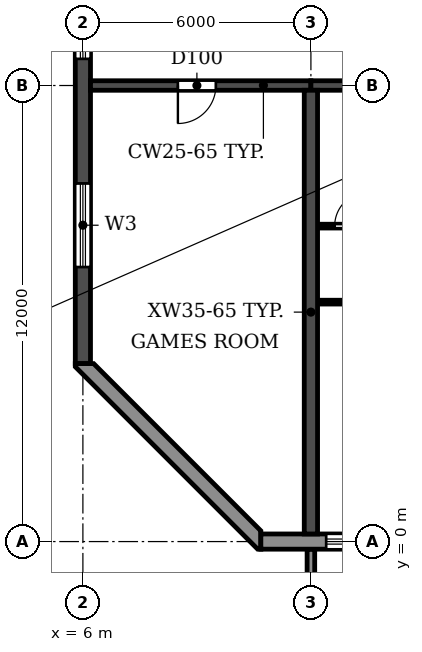
"""IFC4 building model, lengths in metres.
Left out: names, types, materials, properties, quantities, classifications, styles, units other than length and angle.
Written with IfcOpenShell. Run it as: python <this file> out.ifc"""

import sys

from ifc_helpers import new_model, si_unit, direction, frame, frame_2d, origin, place, context, subcontext, project, spatial, polyline, rectangle, outline, extrude, source, transform, mapped, element, fill, save


model = new_model("IFC4")
c1 = context("Model", 3, precision=1e-05, world=origin(), true_north=direction((0.0, 1.0)))
c2 = subcontext(c1, "Body", "Model", "MODEL_VIEW")
j1 = project(units=[si_unit("LENGTHUNIT", "METRE"), si_unit("PLANEANGLEUNIT", "RADIAN")], contexts=[c1])
p1 = place(None, origin())
s1 = spatial("IfcSite", under=j1, at=p1, CompositionType="ELEMENT")
p2 = place(p1, origin())
s2 = spatial("IfcBuilding", under=s1, at=p2, CompositionType="ELEMENT")
p3 = place(p2, frame((0.0, 0.0, 102.6)))
s3 = spatial("IfcBuildingStorey", under=s2, at=p3, CompositionType="ELEMENT", Elevation=102.6)
p4 = place(p3, frame((12.0, 0.2, 0.0), z_axis=(0.0, 0.0, 1.0), x_axis=(0.0, 1.0, 0.0)))
e1 = element("IfcWall", 1, at=p4, inside=s3, PredefinedType="SHEAR", context=c2, shape_type="SweptSolid", body=[
    extrude(rectangle(XDim=11.675, YDim=0.35, at=frame_2d((5.837, 0.0))), origin(), (0.0, 0.0, 1.0), 3.0),
])
p5 = place(p3, frame((6.0, 4.683, 0.0), z_axis=(0.0, 0.0, 1.0), x_axis=(0.0, 1.0, 0.0)))
e2 = element("IfcWall", 2, at=p5, inside=s3, PredefinedType="SHEAR", context=c2, shape_type="SweptSolid", body=[
    extrude(rectangle(XDim=34.234, YDim=0.4, at=frame_2d((17.117, 0.0))), origin(), (0.0, 0.0, 1.0), 3.0),
])
p6 = place(p5, frame((23.817, 0.0, 0.9)))
e3 = element("IfcOpeningElement", 3, at=p6, cuts=e2, PredefinedType="OPENING", context=c2, shape_type="SweptSolid", body=[
    extrude(rectangle(XDim=1.2, YDim=1.5, at=frame_2d((0.6, 0.75))), frame((0.0, 0.21, 0.0), z_axis=(0.0, -1.0, 0.0), x_axis=(1.0, 0.0, 0.0)), (0.0, 0.0, 1.0), 0.42),
])
p7 = place(p5, frame((8.017, 0.0, 0.9)))
e4 = element("IfcOpeningElement", 4, at=p7, cuts=e2, PredefinedType="OPENING", context=c2, shape_type="SweptSolid", body=[
    extrude(rectangle(XDim=1.2, YDim=1.5, at=frame_2d((0.6, 0.75))), frame((0.0, 0.21, 0.0), z_axis=(0.0, -1.0, 0.0), x_axis=(1.0, 0.0, 0.0)), (0.0, 0.0, 1.0), 0.42),
])
p8 = place(p5, frame((15.917, 0.0, 0.9)))
e5 = element("IfcOpeningElement", 5, at=p8, cuts=e2, PredefinedType="OPENING", context=c2, shape_type="SweptSolid", body=[
    extrude(rectangle(XDim=1.2, YDim=1.5, at=frame_2d((0.6, 0.75))), frame((0.0, 0.21, 0.0), z_axis=(0.0, -1.0, 0.0), x_axis=(1.0, 0.0, 0.0)), (0.0, 0.0, 1.0), 0.42),
])
p9 = place(p5, frame((28.894, 0.0, 0.6)))
e6 = element("IfcOpeningElement", 6, at=p9, cuts=e2, PredefinedType="OPENING", context=c2, shape_type="SweptSolid", body=[
    extrude(rectangle(XDim=2.2, YDim=1.8, at=frame_2d((1.1, 0.9))), frame((0.0, 0.21, 0.0), z_axis=(0.0, -1.0, 0.0), x_axis=(1.0, 0.0, 0.0)), (0.0, 0.0, 1.0), 0.42),
])
p10 = place(p5, frame((2.541, 0.0, 0.6)))
e7 = element("IfcOpeningElement", 7, at=p10, cuts=e2, PredefinedType="OPENING", context=c2, shape_type="SweptSolid", body=[
    extrude(rectangle(XDim=2.2, YDim=1.8, at=frame_2d((1.1, 0.9))), frame((0.0, 0.21, 0.0), z_axis=(0.0, -1.0, 0.0), x_axis=(1.0, 0.0, 0.0)), (0.0, 0.0, 1.0), 0.42),
])
p11 = place(p3, frame((6.2, 12.0, 0.0), z_axis=(0.0, 0.0, 1.0), x_axis=(1.0, 0.0, 0.0)))
e8 = element("IfcWall", 8, at=p11, inside=s3, PredefinedType="SHEAR", context=c2, shape_type="SweptSolid", body=[
    extrude(rectangle(XDim=5.8, YDim=0.25, at=frame_2d((2.9, 0.0))), origin(), (0.0, 0.0, 1.0), 2.4),
])
p12 = place(p11, frame((2.3, 0.0, 0.0)))
e9 = element("IfcOpeningElement", 9, at=p12, cuts=e8, PredefinedType="OPENING", context=c2, shape_type="SweptSolid", body=[
    extrude(rectangle(XDim=1.0, YDim=2.1, at=frame_2d((0.5, 1.05))), frame((0.0, 0.135, 0.0), z_axis=(0.0, -1.0, 0.0), x_axis=(1.0, 0.0, 0.0)), (0.0, 0.0, 1.0), 0.27),
])
p13 = place(p3, frame((12.0, 12.0, 0.0), z_axis=(0.0, 0.0, 1.0), x_axis=(1.0, 0.0, 0.0)))
e10 = element("IfcWall", 10, at=p13, inside=s3, PredefinedType="SHEAR", context=c2, shape_type="SweptSolid", body=[
    extrude(rectangle(XDim=6.0, YDim=0.25, at=frame_2d((3.0, 0.0))), origin(), (0.0, 0.0, 1.0), 2.4),
])
p14 = place(p13, frame((2.55, 0.0, 0.0)))
e11 = element("IfcOpeningElement", 11, at=p14, cuts=e10, PredefinedType="OPENING", context=c2, shape_type="SweptSolid", body=[
    extrude(rectangle(XDim=1.0, YDim=2.1, at=frame_2d((0.5, 1.05))), frame((0.0, 0.135, 0.0), z_axis=(0.0, -1.0, 0.0), x_axis=(1.0, 0.0, 0.0)), (0.0, 0.0, 1.0), 0.27),
])
p15 = place(p3, frame((10.683, 0.0, 0.0), z_axis=(0.0, 0.0, 1.0), x_axis=(1.0, 0.0, 0.0)))
e12 = element("IfcWall", 12, at=p15, inside=s3, PredefinedType="STANDARD", context=c2, shape_type="SweptSolid", body=[
    extrude(rectangle(XDim=80.634, YDim=0.4, at=frame_2d((40.317, 0.0))), origin(), (0.0, 0.0, 1.0), 3.0),
])
p16 = place(p15, frame((1.717, 0.0, 0.9)))
e13 = element("IfcOpeningElement", 13, at=p16, cuts=e12, PredefinedType="OPENING", context=c2, shape_type="SweptSolid", body=[
    extrude(rectangle(XDim=2.2, YDim=1.5, at=frame_2d((1.1, 0.75))), frame((0.0, 0.21, 0.0), z_axis=(0.0, -1.0, 0.0), x_axis=(1.0, 0.0, 0.0)), (0.0, 0.0, 1.0), 0.42),
])
p17 = place(p15, frame((4.917, 0.0, 0.0)))
e14 = element("IfcOpeningElement", 14, at=p17, cuts=e12, PredefinedType="OPENING", context=c2, shape_type="SweptSolid", body=[
    extrude(rectangle(XDim=1.8, YDim=2.4, at=frame_2d((0.9, 1.2))), frame((0.0, 0.21, 0.0), z_axis=(0.0, -1.0, 0.0), x_axis=(1.0, 0.0, 0.0)), (0.0, 0.0, 1.0), 0.42),
])
p18 = place(p15, frame((7.717, 0.0, 0.9)))
e15 = element("IfcOpeningElement", 15, at=p18, cuts=e12, PredefinedType="OPENING", context=c2, shape_type="SweptSolid", body=[
    extrude(rectangle(XDim=2.2, YDim=1.5, at=frame_2d((1.1, 0.75))), frame((0.0, 0.21, 0.0), z_axis=(0.0, -1.0, 0.0), x_axis=(1.0, 0.0, 0.0)), (0.0, 0.0, 1.0), 0.42),
])
p19 = place(p15, frame((10.717, 0.0, 0.9)))
e16 = element("IfcOpeningElement", 16, at=p19, cuts=e12, PredefinedType="OPENING", context=c2, shape_type="SweptSolid", body=[
    extrude(rectangle(XDim=2.2, YDim=1.5, at=frame_2d((1.1, 0.75))), frame((0.0, 0.21, 0.0), z_axis=(0.0, -1.0, 0.0), x_axis=(1.0, 0.0, 0.0)), (0.0, 0.0, 1.0), 0.42),
])
p20 = place(p15, frame((13.717, 0.0, 0.9)))
e17 = element("IfcOpeningElement", 17, at=p20, cuts=e12, PredefinedType="OPENING", context=c2, shape_type="SweptSolid", body=[
    extrude(rectangle(XDim=2.2, YDim=1.5, at=frame_2d((1.1, 0.75))), frame((0.0, 0.21, 0.0), z_axis=(0.0, -1.0, 0.0), x_axis=(1.0, 0.0, 0.0)), (0.0, 0.0, 1.0), 0.42),
])
p21 = place(p15, frame((16.717, 0.0, 0.9)))
e18 = element("IfcOpeningElement", 18, at=p21, cuts=e12, PredefinedType="OPENING", context=c2, shape_type="SweptSolid", body=[
    extrude(rectangle(XDim=2.2, YDim=1.5, at=frame_2d((1.1, 0.75))), frame((0.0, 0.21, 0.0), z_axis=(0.0, -1.0, 0.0), x_axis=(1.0, 0.0, 0.0)), (0.0, 0.0, 1.0), 0.42),
])
p22 = place(p15, frame((19.717, 0.0, 0.9)))
e19 = element("IfcOpeningElement", 19, at=p22, cuts=e12, PredefinedType="OPENING", context=c2, shape_type="SweptSolid", body=[
    extrude(rectangle(XDim=2.2, YDim=1.5, at=frame_2d((1.1, 0.75))), frame((0.0, 0.21, 0.0), z_axis=(0.0, -1.0, 0.0), x_axis=(1.0, 0.0, 0.0)), (0.0, 0.0, 1.0), 0.42),
])
p23 = place(p15, frame((22.717, 0.0, 0.9)))
e20 = element("IfcOpeningElement", 20, at=p23, cuts=e12, PredefinedType="OPENING", context=c2, shape_type="SweptSolid", body=[
    extrude(rectangle(XDim=2.2, YDim=1.5, at=frame_2d((1.1, 0.75))), frame((0.0, 0.21, 0.0), z_axis=(0.0, -1.0, 0.0), x_axis=(1.0, 0.0, 0.0)), (0.0, 0.0, 1.0), 0.42),
])
p24 = place(p15, frame((25.717, 0.0, 0.9)))
e21 = element("IfcOpeningElement", 21, at=p24, cuts=e12, PredefinedType="OPENING", context=c2, shape_type="SweptSolid", body=[
    extrude(rectangle(XDim=2.2, YDim=1.5, at=frame_2d((1.1, 0.75))), frame((0.0, 0.21, 0.0), z_axis=(0.0, -1.0, 0.0), x_axis=(1.0, 0.0, 0.0)), (0.0, 0.0, 1.0), 0.42),
])
p25 = place(p15, frame((28.917, 0.0, 0.0)))
e22 = element("IfcOpeningElement", 22, at=p25, cuts=e12, PredefinedType="OPENING", context=c2, shape_type="SweptSolid", body=[
    extrude(rectangle(XDim=1.8, YDim=2.4, at=frame_2d((0.9, 1.2))), frame((0.0, 0.21, 0.0), z_axis=(0.0, -1.0, 0.0), x_axis=(1.0, 0.0, 0.0)), (0.0, 0.0, 1.0), 0.42),
])
p26 = place(p15, frame((31.717, 0.0, 0.9)))
e23 = element("IfcOpeningElement", 23, at=p26, cuts=e12, PredefinedType="OPENING", context=c2, shape_type="SweptSolid", body=[
    extrude(rectangle(XDim=2.2, YDim=1.5, at=frame_2d((1.1, 0.75))), frame((0.0, 0.21, 0.0), z_axis=(0.0, -1.0, 0.0), x_axis=(1.0, 0.0, 0.0)), (0.0, 0.0, 1.0), 0.42),
])
p27 = place(p15, frame((34.717, 0.0, 0.9)))
e24 = element("IfcOpeningElement", 24, at=p27, cuts=e12, PredefinedType="OPENING", context=c2, shape_type="SweptSolid", body=[
    extrude(rectangle(XDim=2.2, YDim=1.5, at=frame_2d((1.1, 0.75))), frame((0.0, 0.21, 0.0), z_axis=(0.0, -1.0, 0.0), x_axis=(1.0, 0.0, 0.0)), (0.0, 0.0, 1.0), 0.42),
])
p28 = place(p15, frame((37.717, 0.0, 0.9)))
e25 = element("IfcOpeningElement", 25, at=p28, cuts=e12, PredefinedType="OPENING", context=c2, shape_type="SweptSolid", body=[
    extrude(rectangle(XDim=2.2, YDim=1.5, at=frame_2d((1.1, 0.75))), frame((0.0, 0.21, 0.0), z_axis=(0.0, -1.0, 0.0), x_axis=(1.0, 0.0, 0.0)), (0.0, 0.0, 1.0), 0.42),
])
p29 = place(p15, frame((40.717, 0.0, 0.9)))
e26 = element("IfcOpeningElement", 26, at=p29, cuts=e12, PredefinedType="OPENING", context=c2, shape_type="SweptSolid", body=[
    extrude(rectangle(XDim=2.2, YDim=1.5, at=frame_2d((1.1, 0.75))), frame((0.0, 0.21, 0.0), z_axis=(0.0, -1.0, 0.0), x_axis=(1.0, 0.0, 0.0)), (0.0, 0.0, 1.0), 0.42),
])
p30 = place(p15, frame((43.717, 0.0, 0.9)))
e27 = element("IfcOpeningElement", 27, at=p30, cuts=e12, PredefinedType="OPENING", context=c2, shape_type="SweptSolid", body=[
    extrude(rectangle(XDim=2.2, YDim=1.5, at=frame_2d((1.1, 0.75))), frame((0.0, 0.21, 0.0), z_axis=(0.0, -1.0, 0.0), x_axis=(1.0, 0.0, 0.0)), (0.0, 0.0, 1.0), 0.42),
])
p31 = place(p15, frame((46.717, 0.0, 0.9)))
e28 = element("IfcOpeningElement", 28, at=p31, cuts=e12, PredefinedType="OPENING", context=c2, shape_type="SweptSolid", body=[
    extrude(rectangle(XDim=2.2, YDim=1.5, at=frame_2d((1.1, 0.75))), frame((0.0, 0.21, 0.0), z_axis=(0.0, -1.0, 0.0), x_axis=(1.0, 0.0, 0.0)), (0.0, 0.0, 1.0), 0.42),
])
p32 = place(p15, frame((49.917, 0.0, 0.0)))
e29 = element("IfcOpeningElement", 29, at=p32, cuts=e12, PredefinedType="OPENING", context=c2, shape_type="SweptSolid", body=[
    extrude(rectangle(XDim=1.8, YDim=2.4, at=frame_2d((0.9, 1.2))), frame((0.0, 0.21, 0.0), z_axis=(0.0, -1.0, 0.0), x_axis=(1.0, 0.0, 0.0)), (0.0, 0.0, 1.0), 0.42),
])
p33 = place(p15, frame((52.717, 0.0, 0.9)))
e30 = element("IfcOpeningElement", 30, at=p33, cuts=e12, PredefinedType="OPENING", context=c2, shape_type="SweptSolid", body=[
    extrude(rectangle(XDim=2.2, YDim=1.5, at=frame_2d((1.1, 0.75))), frame((0.0, 0.21, 0.0), z_axis=(0.0, -1.0, 0.0), x_axis=(1.0, 0.0, 0.0)), (0.0, 0.0, 1.0), 0.42),
])
p34 = place(p15, frame((55.717, 0.0, 0.9)))
e31 = element("IfcOpeningElement", 31, at=p34, cuts=e12, PredefinedType="OPENING", context=c2, shape_type="SweptSolid", body=[
    extrude(rectangle(XDim=2.2, YDim=1.5, at=frame_2d((1.1, 0.75))), frame((0.0, 0.21, 0.0), z_axis=(0.0, -1.0, 0.0), x_axis=(1.0, 0.0, 0.0)), (0.0, 0.0, 1.0), 0.42),
])
p35 = place(p15, frame((58.717, 0.0, 0.9)))
e32 = element("IfcOpeningElement", 32, at=p35, cuts=e12, PredefinedType="OPENING", context=c2, shape_type="SweptSolid", body=[
    extrude(rectangle(XDim=2.2, YDim=1.5, at=frame_2d((1.1, 0.75))), frame((0.0, 0.21, 0.0), z_axis=(0.0, -1.0, 0.0), x_axis=(1.0, 0.0, 0.0)), (0.0, 0.0, 1.0), 0.42),
])
p36 = place(p15, frame((61.717, 0.0, 0.9)))
e33 = element("IfcOpeningElement", 33, at=p36, cuts=e12, PredefinedType="OPENING", context=c2, shape_type="SweptSolid", body=[
    extrude(rectangle(XDim=2.2, YDim=1.5, at=frame_2d((1.1, 0.75))), frame((0.0, 0.21, 0.0), z_axis=(0.0, -1.0, 0.0), x_axis=(1.0, 0.0, 0.0)), (0.0, 0.0, 1.0), 0.42),
])
p37 = place(p15, frame((64.717, 0.0, 0.9)))
e34 = element("IfcOpeningElement", 34, at=p37, cuts=e12, PredefinedType="OPENING", context=c2, shape_type="SweptSolid", body=[
    extrude(rectangle(XDim=2.2, YDim=1.5, at=frame_2d((1.1, 0.75))), frame((0.0, 0.21, 0.0), z_axis=(0.0, -1.0, 0.0), x_axis=(1.0, 0.0, 0.0)), (0.0, 0.0, 1.0), 0.42),
])
p38 = place(p15, frame((67.717, 0.0, 0.9)))
e35 = element("IfcOpeningElement", 35, at=p38, cuts=e12, PredefinedType="OPENING", context=c2, shape_type="SweptSolid", body=[
    extrude(rectangle(XDim=2.2, YDim=1.5, at=frame_2d((1.1, 0.75))), frame((0.0, 0.21, 0.0), z_axis=(0.0, -1.0, 0.0), x_axis=(1.0, 0.0, 0.0)), (0.0, 0.0, 1.0), 0.42),
])
p39 = place(p15, frame((70.717, 0.0, 0.9)))
e36 = element("IfcOpeningElement", 36, at=p39, cuts=e12, PredefinedType="OPENING", context=c2, shape_type="SweptSolid", body=[
    extrude(rectangle(XDim=2.2, YDim=1.5, at=frame_2d((1.1, 0.75))), frame((0.0, 0.21, 0.0), z_axis=(0.0, -1.0, 0.0), x_axis=(1.0, 0.0, 0.0)), (0.0, 0.0, 1.0), 0.42),
])
p40 = place(p15, frame((73.717, 0.0, 0.9)))
e37 = element("IfcOpeningElement", 37, at=p40, cuts=e12, PredefinedType="OPENING", context=c2, shape_type="SweptSolid", body=[
    extrude(rectangle(XDim=2.2, YDim=1.5, at=frame_2d((1.1, 0.75))), frame((0.0, 0.21, 0.0), z_axis=(0.0, -1.0, 0.0), x_axis=(1.0, 0.0, 0.0)), (0.0, 0.0, 1.0), 0.42),
])
p41 = place(p15, frame((76.917, 0.0, 0.0)))
e38 = element("IfcOpeningElement", 38, at=p41, cuts=e12, PredefinedType="OPENING", context=c2, shape_type="SweptSolid", body=[
    extrude(rectangle(XDim=1.8, YDim=2.4, at=frame_2d((0.9, 1.2))), frame((0.0, 0.21, 0.0), z_axis=(0.0, -1.0, 0.0), x_axis=(1.0, 0.0, 0.0)), (0.0, 0.0, 1.0), 0.42),
])
p42 = place(p3, origin())
e39 = element("IfcWall", 39, at=p42, inside=s3, PredefinedType="STANDARD", context=c2, shape_type="SweptSolid", body=[
    extrude(outline(polyline([(5.8, 4.683), (5.8, 4.6), (10.6, -0.2), (10.683, -0.2), (10.683, 0.283), (6.283, 4.683), (5.8, 4.683)])), origin(), (0.0, 0.0, 1.0), 3.0),
])
m1 = source(origin(), c2, "Body", "SweptSolid", [
    extrude(outline(polyline([(0.0, 0.0), (0.2, 0.0), (0.2, 1.65), (0.0, 1.65), (0.0, 0.0)])), origin(), (0.0, 0.0, 1.0), 3.1),
])
p43 = place(p3, frame((11.9, -1.85, 0.0)))
e40 = element("IfcWall", 40, at=p43, inside=s3, PredefinedType="STANDARD", context=c2, shape_type="MappedRepresentation", body=[
    mapped(m1, transform((0.0, 0.0, 0.0))),
])
p44 = place(p3, frame((12.185, 6.3, 0.0), z_axis=(0.0, 0.0, 1.0), x_axis=(1.0, 0.0, 0.0)))
e41 = element("IfcWall", 41, at=p44, inside=s3, PredefinedType="PARTITIONING", context=c2, shape_type="SweptSolid", body=[
    extrude(rectangle(XDim=2.865, YDim=0.1, at=frame_2d((1.433, 0.0))), origin(), (0.0, 0.0, 1.0), 3.0),
])
p45 = place(p44, frame((1.415, 0.0, 0.0)))
e42 = element("IfcOpeningElement", 42, at=p45, cuts=e41, PredefinedType="OPENING", context=c2, shape_type="SweptSolid", body=[
    extrude(rectangle(XDim=0.9, YDim=2.1, at=frame_2d((0.45, 1.05))), frame((0.0, 0.06, 0.0), z_axis=(0.0, -1.0, 0.0), x_axis=(1.0, 0.0, 0.0)), (0.0, 0.0, 1.0), 0.12),
])
p46 = place(p3, frame((12.185, 8.3, 0.0), z_axis=(0.0, 0.0, 1.0), x_axis=(1.0, 0.0, 0.0)))
e43 = element("IfcWall", 43, at=p46, inside=s3, PredefinedType="PARTITIONING", context=c2, shape_type="SweptSolid", body=[
    extrude(rectangle(XDim=2.015, YDim=0.1, at=frame_2d((1.007, 0.0))), origin(), (0.0, 0.0, 1.0), 3.0),
])
p47 = place(p46, frame((0.44, 0.0, 0.0)))
e44 = element("IfcOpeningElement", 44, at=p47, cuts=e43, PredefinedType="OPENING", context=c2, shape_type="SweptSolid", body=[
    extrude(rectangle(XDim=0.9, YDim=2.1, at=frame_2d((0.45, 1.05))), frame((0.0, 0.06, 0.0), z_axis=(0.0, -1.0, 0.0), x_axis=(1.0, 0.0, 0.0)), (0.0, 0.0, 1.0), 0.12),
])
p48 = place(p16, origin())
e45 = element("IfcWindow", 45, at=p48, inside=s3, PartitioningType="DOUBLE_PANEL_HORIZONTAL", PredefinedType="WINDOW", context=c2, shape_type="SweptSolid", body=[
    extrude(rectangle(XDim=2.2, YDim=1.5, at=frame_2d((1.1, 0.75))), frame((0.0, 0.03, 0.0), z_axis=(0.0, -1.0, 0.0), x_axis=(1.0, 0.0, 0.0)), (0.0, 0.0, 1.0), 0.06),
])
fill(e13, e45)
p49 = place(p7, origin())
e46 = element("IfcWindow", 46, at=p49, inside=s3, PartitioningType="SINGLE_PANEL", PredefinedType="WINDOW", context=c2, shape_type="SweptSolid", body=[
    extrude(rectangle(XDim=1.2, YDim=1.5, at=frame_2d((0.6, 0.75))), frame((0.0, 0.03, 0.0), z_axis=(0.0, -1.0, 0.0), x_axis=(1.0, 0.0, 0.0)), (0.0, 0.0, 1.0), 0.06),
])
fill(e4, e46)
p50 = place(p10, origin())
e47 = element("IfcWindow", 47, at=p50, inside=s3, PartitioningType="DOUBLE_PANEL_HORIZONTAL", PredefinedType="WINDOW", context=c2, shape_type="SweptSolid", body=[
    extrude(rectangle(XDim=2.2, YDim=1.8, at=frame_2d((1.1, 0.9))), frame((0.0, 0.03, 0.0), z_axis=(0.0, -1.0, 0.0), x_axis=(1.0, 0.0, 0.0)), (0.0, 0.0, 1.0), 0.06),
])
fill(e7, e47)
p51 = place(p12, frame((1.0, 0.0, 0.0), z_axis=(0.0, 0.0, 1.0), x_axis=(-1.0, 0.0, 0.0)))
e48 = element("IfcDoor", 48, at=p51, inside=s3, OperationType="SINGLE_SWING_RIGHT", PredefinedType="DOOR", context=c2, shape_type="SweptSolid", body=[
    extrude(rectangle(XDim=1.0, YDim=2.1, at=frame_2d((0.5, 1.05))), frame((0.0, 0.025, 0.0), z_axis=(0.0, -1.0, 0.0), x_axis=(1.0, 0.0, 0.0)), (0.0, 0.0, 1.0), 0.05),
])
fill(e9, e48)
p52 = place(p47, origin())
e49 = element("IfcDoor", 49, at=p52, inside=s3, OperationType="SINGLE_SWING_RIGHT", PredefinedType="DOOR", context=c2, shape_type="SweptSolid", body=[
    extrude(rectangle(XDim=0.9, YDim=2.1, at=frame_2d((0.45, 1.05))), frame((0.0, 0.025, 0.0), z_axis=(0.0, -1.0, 0.0), x_axis=(1.0, 0.0, 0.0)), (0.0, 0.0, 1.0), 0.05),
])
fill(e44, e49)
save(model, sys.argv[1])
